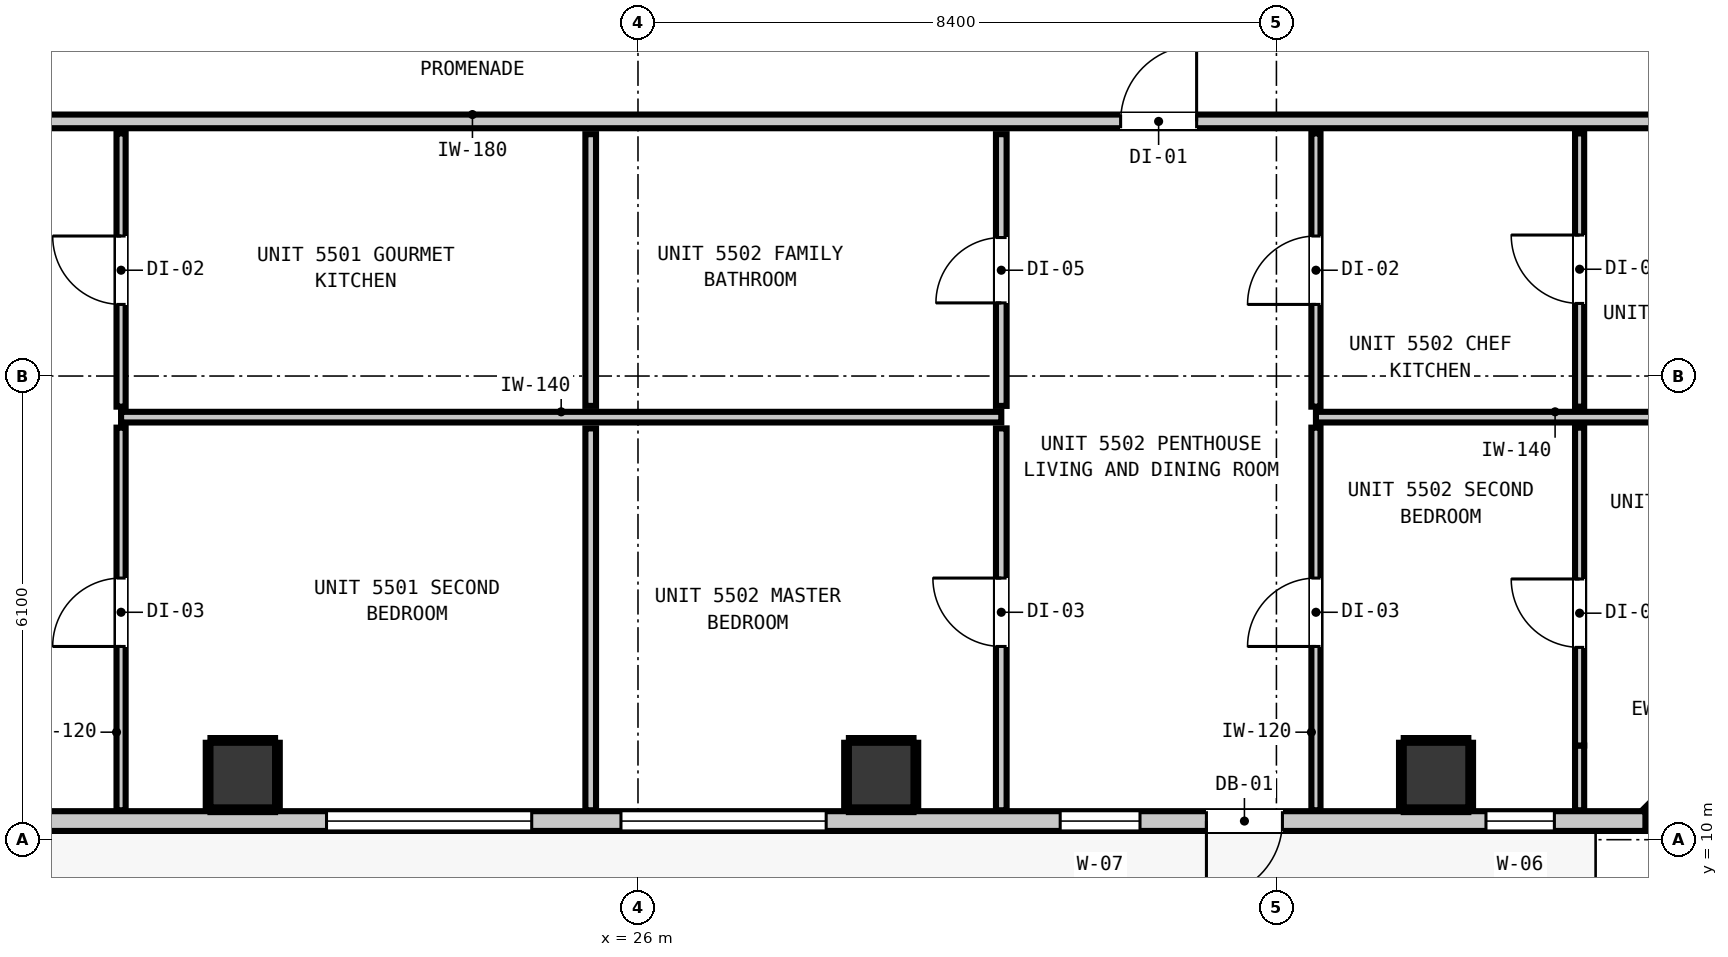
"""IFC4 building model, lengths in metres.
Left out: names, types, materials, properties, quantities, classifications, styles, units other than length and angle.
Written with IfcOpenShell. Run it as: python <this file> out.ifc"""

import sys

from ifc_helpers import new_model, si_unit, direction, frame, frame_2d, origin, origin_2d, place, context, subcontext, project, spatial, rectangle, extrude, element, fill, save


model = new_model("IFC4")
c1 = context("Model", 3, precision=1e-05, world=origin(), true_north=direction((0.0, 1.0)))
c2 = subcontext(c1, "Body", "Model", "MODEL_VIEW")
j1 = project(units=[si_unit("LENGTHUNIT", "METRE"), si_unit("PLANEANGLEUNIT", "RADIAN")], contexts=[c1])
p1 = place(None, origin())
s1 = spatial("IfcSite", under=j1, at=p1, CompositionType="ELEMENT")
p2 = place(p1, origin())
s2 = spatial("IfcBuilding", under=s1, at=p2, CompositionType="ELEMENT")
p3 = place(p2, frame((0.0, 0.0, 190.16)))
s3 = spatial("IfcBuildingStorey", under=s2, at=p3, CompositionType="ELEMENT", Elevation=190.16)
for number, where, z_axis, x_axis in (
    (1, (20.8, 10.85, -0.2), (0.0, 0.0, 1.0), (1.0, 0.0, 0.0)),
    (2, (29.2, 10.85, -0.2), (0.0, 0.0, 1.0), (1.0, 0.0, 0.0)),
    (3, (36.5, 10.85, -0.2), (0.0, 0.0, 1.0), (1.0, 0.0, 0.0)),
):
    element("IfcColumn", number, at=place(p3, frame(where, z_axis=z_axis, x_axis=x_axis)), inside=s3, PredefinedType="COLUMN", context=c2, shape_type="SweptSolid", body=[
        extrude(rectangle(XDim=0.85, YDim=0.85, at=origin_2d()), origin(), (0.0, 0.0, 1.0), 3.52),
    ])
p4 = place(p3, frame((41.355, 12.345, 0.0), z_axis=(0.0, 0.0, 1.0), x_axis=(-0.707147883682, -0.707065676302, 0.0)))
e4 = element("IfcWall", 4, at=p4, inside=s3, PredefinedType="STANDARD", context=c2, shape_type="SweptSolid", body=[
    extrude(rectangle(XDim=2.97, YDim=0.26, at=frame_2d((1.485, 0.0))), origin(), (0.0, 0.0, 1.0), 3.1),
])
p5 = place(p3, frame((39.255, 10.245, 0.0), z_axis=(0.0, 0.0, 1.0), x_axis=(-1.0, 0.0, 0.0)))
e5 = element("IfcWall", 5, at=p5, inside=s3, PredefinedType="STANDARD", context=c2, shape_type="SweptSolid", body=[
    extrude(rectangle(XDim=32.71, YDim=0.26, at=frame_2d((16.355, 0.0))), origin(), (0.0, 0.0, 1.0), 3.1),
])
p6 = place(p5, frame((4.776, 0.0, 0.0)))
e6 = element("IfcOpeningElement", 6, at=p6, cuts=e5, PredefinedType="OPENING", context=c2, shape_type="SweptSolid", body=[
    extrude(rectangle(XDim=1.0, YDim=2.15, at=frame_2d((0.5, 1.075))), frame((0.0, 0.14, 0.0), z_axis=(0.0, -1.0, 0.0), x_axis=(1.0, 0.0, 0.0)), (0.0, 0.0, 1.0), 0.28),
])
p7 = place(p5, frame((21.443, 0.0, 0.85)))
e7 = element("IfcOpeningElement", 7, at=p7, cuts=e5, PredefinedType="OPENING", context=c2, shape_type="SweptSolid", body=[
    extrude(rectangle(XDim=2.7, YDim=2.0, at=frame_2d((1.35, 1.0))), frame((0.0, 0.14, 0.0), z_axis=(0.0, -1.0, 0.0), x_axis=(1.0, 0.0, 0.0)), (0.0, 0.0, 1.0), 0.28),
])
p8 = place(p5, frame((29.443, 0.0, 0.85)))
e8 = element("IfcOpeningElement", 8, at=p8, cuts=e5, PredefinedType="OPENING", context=c2, shape_type="SweptSolid", body=[
    extrude(rectangle(XDim=2.7, YDim=2.0, at=frame_2d((1.35, 1.0))), frame((0.0, 0.14, 0.0), z_axis=(0.0, -1.0, 0.0), x_axis=(1.0, 0.0, 0.0)), (0.0, 0.0, 1.0), 0.28),
])
p9 = place(p5, frame((14.653, 0.0, 0.85)))
e9 = element("IfcOpeningElement", 9, at=p9, cuts=e5, PredefinedType="OPENING", context=c2, shape_type="SweptSolid", body=[
    extrude(rectangle(XDim=2.7, YDim=2.0, at=frame_2d((1.35, 1.0))), frame((0.0, 0.14, 0.0), z_axis=(0.0, -1.0, 0.0), x_axis=(1.0, 0.0, 0.0)), (0.0, 0.0, 1.0), 0.28),
])
p10 = place(p5, frame((6.65, 0.0, 0.85)))
e10 = element("IfcOpeningElement", 10, at=p10, cuts=e5, PredefinedType="OPENING", context=c2, shape_type="SweptSolid", body=[
    extrude(rectangle(XDim=1.05, YDim=1.65, at=frame_2d((0.525, 0.825))), frame((0.0, 0.14, 0.0), z_axis=(0.0, -1.0, 0.0), x_axis=(1.0, 0.0, 0.0)), (0.0, 0.0, 1.0), 0.28),
])
p11 = place(p5, frame((10.779, 0.0, 0.85)))
e11 = element("IfcOpeningElement", 11, at=p11, cuts=e5, PredefinedType="OPENING", context=c2, shape_type="SweptSolid", body=[
    extrude(rectangle(XDim=2.7, YDim=2.0, at=frame_2d((1.35, 1.0))), frame((0.0, 0.14, 0.0), z_axis=(0.0, -1.0, 0.0), x_axis=(1.0, 0.0, 0.0)), (0.0, 0.0, 1.0), 0.28),
])
p12 = place(p5, frame((1.198, 0.0, 0.85)))
e12 = element("IfcOpeningElement", 12, at=p12, cuts=e5, PredefinedType="OPENING", context=c2, shape_type="SweptSolid", body=[
    extrude(rectangle(XDim=0.9, YDim=1.5, at=frame_2d((0.45, 0.75))), frame((0.0, 0.14, 0.0), z_axis=(0.0, -1.0, 0.0), x_axis=(1.0, 0.0, 0.0)), (0.0, 0.0, 1.0), 0.28),
])
p13 = place(p3, frame((4.587, 19.45, 0.0), z_axis=(0.0, 0.0, 1.0), x_axis=(1.0, 0.0, 0.0)))
e13 = element("IfcWall", 13, at=p13, inside=s3, PredefinedType="PARTITIONING", context=c2, shape_type="SweptSolid", body=[
    extrude(rectangle(XDim=36.626, YDim=0.18, at=frame_2d((18.313, 0.0))), origin(), (0.0, 0.0, 1.0), 3.1),
])
p14 = place(p13, frame((9.707, 0.0, 0.0)))
e14 = element("IfcOpeningElement", 14, at=p14, cuts=e13, PredefinedType="OPENING", context=c2, shape_type="SweptSolid", body=[
    extrude(rectangle(XDim=1.0, YDim=2.15, at=frame_2d((0.5, 1.075))), frame((0.0, 0.1, 0.0), z_axis=(0.0, -1.0, 0.0), x_axis=(1.0, 0.0, 0.0)), (0.0, 0.0, 1.0), 0.2),
])
p15 = place(p13, frame((27.763, 0.0, 0.0)))
e15 = element("IfcOpeningElement", 15, at=p15, cuts=e13, PredefinedType="OPENING", context=c2, shape_type="SweptSolid", body=[
    extrude(rectangle(XDim=1.0, YDim=2.15, at=frame_2d((0.5, 1.075))), frame((0.0, 0.1, 0.0), z_axis=(0.0, -1.0, 0.0), x_axis=(1.0, 0.0, 0.0)), (0.0, 0.0, 1.0), 0.2),
])
p16 = place(p3, frame((19.199, 15.559, 0.0), z_axis=(0.0, 0.0, 1.0), x_axis=(1.0, 0.0, 0.0)))
e16 = element("IfcWall", 16, at=p16, inside=s3, PredefinedType="PARTITIONING", context=c2, shape_type="SweptSolid", body=[
    extrude(rectangle(XDim=11.581, YDim=0.14, at=frame_2d((5.791, 0.0))), origin(), (0.0, 0.0, 1.0), 3.1),
])
p17 = place(p3, frame((34.92, 15.559, 0.0), z_axis=(0.0, 0.0, 1.0), x_axis=(1.0, 0.0, 0.0)))
e17 = element("IfcWall", 17, at=p17, inside=s3, PredefinedType="PARTITIONING", context=c2, shape_type="SweptSolid", body=[
    extrude(rectangle(XDim=6.293, YDim=0.14, at=frame_2d((3.146, 0.0))), origin(), (0.0, 0.0, 1.0), 3.1),
])
p18 = place(p3, frame((25.378, 10.387, 0.0), z_axis=(0.0, 0.0, 1.0), x_axis=(0.0, 1.0, 0.0)))
e18 = element("IfcWall", 18, at=p18, inside=s3, PredefinedType="PARTITIONING", context=c2, shape_type="SweptSolid", body=[
    extrude(rectangle(XDim=5.024, YDim=0.14, at=frame_2d((2.512, 0.0))), origin(), (0.0, 0.0, 1.0), 3.1),
])
p19 = place(p3, frame((25.378, 15.707, 0.0), z_axis=(0.0, 0.0, 1.0), x_axis=(0.0, 1.0, 0.0)))
e19 = element("IfcWall", 19, at=p19, inside=s3, PredefinedType="PARTITIONING", context=c2, shape_type="SweptSolid", body=[
    extrude(rectangle(XDim=3.575, YDim=0.14, at=frame_2d((1.788, 0.0))), origin(), (0.0, 0.0, 1.0), 3.1),
])
p20 = place(p3, frame((30.78, 10.387, 0.0), z_axis=(0.0, 0.0, 1.0), x_axis=(0.0, 1.0, 0.0)))
e20 = element("IfcWall", 20, at=p20, inside=s3, PredefinedType="PARTITIONING", context=c2, shape_type="SweptSolid", body=[
    extrude(rectangle(XDim=5.024, YDim=0.14, at=frame_2d((2.512, 0.0))), origin(), (0.0, 0.0, 1.0), 3.1),
])
p21 = place(p20, frame((2.155, 0.0, 0.0)))
e21 = element("IfcOpeningElement", 21, at=p21, cuts=e20, PredefinedType="OPENING", context=c2, shape_type="SweptSolid", body=[
    extrude(rectangle(XDim=0.9, YDim=2.1, at=frame_2d((0.45, 1.05))), frame((0.0, 0.08, 0.0), z_axis=(0.0, -1.0, 0.0), x_axis=(1.0, 0.0, 0.0)), (0.0, 0.0, 1.0), 0.16),
])
p22 = place(p3, frame((30.78, 15.707, 0.0), z_axis=(0.0, 0.0, 1.0), x_axis=(0.0, 1.0, 0.0)))
e22 = element("IfcWall", 22, at=p22, inside=s3, PredefinedType="PARTITIONING", context=c2, shape_type="SweptSolid", body=[
    extrude(rectangle(XDim=3.575, YDim=0.14, at=frame_2d((1.788, 0.0))), origin(), (0.0, 0.0, 1.0), 3.1),
])
p23 = place(p22, frame((1.355, 0.0, 0.0)))
e23 = element("IfcOpeningElement", 23, at=p23, cuts=e22, PredefinedType="OPENING", context=c2, shape_type="SweptSolid", body=[
    extrude(rectangle(XDim=0.86, YDim=2.02, at=frame_2d((0.43, 1.01))), frame((0.0, 0.08, 0.0), z_axis=(0.0, -1.0, 0.0), x_axis=(1.0, 0.0, 0.0)), (0.0, 0.0, 1.0), 0.16),
])
p24 = place(p3, frame((19.199, 10.387, 0.0), z_axis=(0.0, 0.0, 1.0), x_axis=(0.0, 1.0, 0.0)))
e24 = element("IfcWall", 24, at=p24, inside=s3, PredefinedType="PARTITIONING", context=c2, shape_type="SweptSolid", body=[
    extrude(rectangle(XDim=5.034, YDim=0.12, at=frame_2d((2.517, 0.0))), origin(), (0.0, 0.0, 1.0), 3.1),
])
p25 = place(p24, frame((2.155, 0.0, 0.0)))
e25 = element("IfcOpeningElement", 25, at=p25, cuts=e24, PredefinedType="OPENING", context=c2, shape_type="SweptSolid", body=[
    extrude(rectangle(XDim=0.9, YDim=2.1, at=frame_2d((0.45, 1.05))), frame((0.0, 0.07, 0.0), z_axis=(0.0, -1.0, 0.0), x_axis=(1.0, 0.0, 0.0)), (0.0, 0.0, 1.0), 0.14),
])
p26 = place(p3, frame((19.199, 15.697, 0.0), z_axis=(0.0, 0.0, 1.0), x_axis=(0.0, 1.0, 0.0)))
e26 = element("IfcWall", 26, at=p26, inside=s3, PredefinedType="PARTITIONING", context=c2, shape_type="SweptSolid", body=[
    extrude(rectangle(XDim=3.595, YDim=0.12, at=frame_2d((1.797, 0.0))), origin(), (0.0, 0.0, 1.0), 3.1),
])
p27 = place(p26, frame((1.345, 0.0, 0.0)))
e27 = element("IfcOpeningElement", 27, at=p27, cuts=e26, PredefinedType="OPENING", context=c2, shape_type="SweptSolid", body=[
    extrude(rectangle(XDim=0.9, YDim=2.1, at=frame_2d((0.45, 1.05))), frame((0.0, 0.07, 0.0), z_axis=(0.0, -1.0, 0.0), x_axis=(1.0, 0.0, 0.0)), (0.0, 0.0, 1.0), 0.14),
])
p28 = place(p3, frame((34.92, 10.387, 0.0), z_axis=(0.0, 0.0, 1.0), x_axis=(0.0, 1.0, 0.0)))
e28 = element("IfcWall", 28, at=p28, inside=s3, PredefinedType="PARTITIONING", context=c2, shape_type="SweptSolid", body=[
    extrude(rectangle(XDim=5.034, YDim=0.12, at=frame_2d((2.517, 0.0))), origin(), (0.0, 0.0, 1.0), 3.1),
])
p29 = place(p28, frame((2.155, 0.0, 0.0)))
e29 = element("IfcOpeningElement", 29, at=p29, cuts=e28, PredefinedType="OPENING", context=c2, shape_type="SweptSolid", body=[
    extrude(rectangle(XDim=0.9, YDim=2.1, at=frame_2d((0.45, 1.05))), frame((0.0, 0.07, 0.0), z_axis=(0.0, -1.0, 0.0), x_axis=(1.0, 0.0, 0.0)), (0.0, 0.0, 1.0), 0.14),
])
p30 = place(p3, frame((34.92, 15.697, 0.0), z_axis=(0.0, 0.0, 1.0), x_axis=(0.0, 1.0, 0.0)))
e30 = element("IfcWall", 30, at=p30, inside=s3, PredefinedType="PARTITIONING", context=c2, shape_type="SweptSolid", body=[
    extrude(rectangle(XDim=3.595, YDim=0.12, at=frame_2d((1.797, 0.0))), origin(), (0.0, 0.0, 1.0), 3.1),
])
p31 = place(p30, frame((1.345, 0.0, 0.0)))
e31 = element("IfcOpeningElement", 31, at=p31, cuts=e30, PredefinedType="OPENING", context=c2, shape_type="SweptSolid", body=[
    extrude(rectangle(XDim=0.9, YDim=2.1, at=frame_2d((0.45, 1.05))), frame((0.0, 0.07, 0.0), z_axis=(0.0, -1.0, 0.0), x_axis=(1.0, 0.0, 0.0)), (0.0, 0.0, 1.0), 0.14),
])
p32 = place(p3, frame((38.389, 10.387, 0.0), z_axis=(0.0, 0.0, 1.0), x_axis=(0.0, 1.0, 0.0)))
e32 = element("IfcWall", 32, at=p32, inside=s3, PredefinedType="PARTITIONING", context=c2, shape_type="SweptSolid", body=[
    extrude(rectangle(XDim=0.852, YDim=0.12, at=frame_2d((0.426, 0.0))), origin(), (0.0, 0.0, 1.0), 3.1),
])
p33 = place(p3, frame((38.389, 11.239, 0.0), z_axis=(0.0, 0.0, 1.0), x_axis=(0.0, 1.0, 0.0)))
e33 = element("IfcWall", 33, at=p33, inside=s3, PredefinedType="PARTITIONING", context=c2, shape_type="SweptSolid", body=[
    extrude(rectangle(XDim=4.182, YDim=0.12, at=frame_2d((2.091, 0.0))), origin(), (0.0, 0.0, 1.0), 2.477),
])
p34 = place(p33, frame((1.291, 0.0, 0.0)))
e34 = element("IfcOpeningElement", 34, at=p34, cuts=e33, PredefinedType="OPENING", context=c2, shape_type="SweptSolid", body=[
    extrude(rectangle(XDim=0.9, YDim=2.1, at=frame_2d((0.45, 1.05))), frame((0.0, 0.07, 0.0), z_axis=(0.0, -1.0, 0.0), x_axis=(1.0, 0.0, 0.0)), (0.0, 0.0, 1.0), 0.14),
])
p35 = place(p3, frame((38.389, 15.697, 0.0), z_axis=(0.0, 0.0, 1.0), x_axis=(0.0, 1.0, 0.0)))
e35 = element("IfcWall", 35, at=p35, inside=s3, PredefinedType="PARTITIONING", context=c2, shape_type="SweptSolid", body=[
    extrude(rectangle(XDim=3.595, YDim=0.12, at=frame_2d((1.797, 0.0))), origin(), (0.0, 0.0, 1.0), 2.477),
])
p36 = place(p35, frame((1.358, 0.0, 0.0)))
e36 = element("IfcOpeningElement", 36, at=p36, cuts=e35, PredefinedType="OPENING", context=c2, shape_type="SweptSolid", body=[
    extrude(rectangle(XDim=0.9, YDim=2.1, at=frame_2d((0.45, 1.05))), frame((0.0, 0.07, 0.0), z_axis=(0.0, -1.0, 0.0), x_axis=(1.0, 0.0, 0.0)), (0.0, 0.0, 1.0), 0.14),
])
for number, where, z_axis, x_axis in (
    (37, (20.375, 10.393, 0.0), (0.0, 0.0, 1.0), (1.0, 0.0, 0.0)),
    (38, (20.375, 11.307, 0.0), (0.0, 0.0, 1.0), (1.0, 0.0, 0.0)),
):
    element("IfcWall", number, at=place(p3, frame(where, z_axis=z_axis, x_axis=x_axis)), inside=s3, PredefinedType="PARTITIONING", context=c2, shape_type="SweptSolid", body=[
        extrude(rectangle(XDim=0.85, YDim=0.06, at=frame_2d((0.425, 0.0))), origin(), (0.0, 0.0, 1.0), 1.45),
    ])
for number, where, z_axis, x_axis in (
    (39, (20.343, 10.425, 0.0), (0.0, 0.0, 1.0), (0.0, 1.0, 0.0)),
    (40, (21.257, 10.425, 0.0), (0.0, 0.0, 1.0), (0.0, 1.0, 0.0)),
):
    element("IfcWall", number, at=place(p3, frame(where, z_axis=z_axis, x_axis=x_axis)), inside=s3, PredefinedType="PARTITIONING", context=c2, shape_type="SweptSolid", body=[
        extrude(rectangle(XDim=0.85, YDim=0.06, at=frame_2d((0.425, 0.0))), origin(), (0.0, 0.0, 1.0), 1.45),
    ])
for number, where, z_axis, x_axis in (
    (41, (28.775, 10.393, 0.0), (0.0, 0.0, 1.0), (1.0, 0.0, 0.0)),
    (42, (28.775, 11.307, 0.0), (0.0, 0.0, 1.0), (1.0, 0.0, 0.0)),
):
    element("IfcWall", number, at=place(p3, frame(where, z_axis=z_axis, x_axis=x_axis)), inside=s3, PredefinedType="PARTITIONING", context=c2, shape_type="SweptSolid", body=[
        extrude(rectangle(XDim=0.85, YDim=0.06, at=frame_2d((0.425, 0.0))), origin(), (0.0, 0.0, 1.0), 1.45),
    ])
for number, where, z_axis, x_axis in (
    (43, (28.743, 10.425, 0.0), (0.0, 0.0, 1.0), (0.0, 1.0, 0.0)),
    (44, (29.657, 10.425, 0.0), (0.0, 0.0, 1.0), (0.0, 1.0, 0.0)),
):
    element("IfcWall", number, at=place(p3, frame(where, z_axis=z_axis, x_axis=x_axis)), inside=s3, PredefinedType="PARTITIONING", context=c2, shape_type="SweptSolid", body=[
        extrude(rectangle(XDim=0.85, YDim=0.06, at=frame_2d((0.425, 0.0))), origin(), (0.0, 0.0, 1.0), 1.45),
    ])
for number, where, z_axis, x_axis in (
    (45, (36.075, 10.393, 0.0), (0.0, 0.0, 1.0), (1.0, 0.0, 0.0)),
    (46, (36.075, 11.307, 0.0), (0.0, 0.0, 1.0), (1.0, 0.0, 0.0)),
):
    element("IfcWall", number, at=place(p3, frame(where, z_axis=z_axis, x_axis=x_axis)), inside=s3, PredefinedType="PARTITIONING", context=c2, shape_type="SweptSolid", body=[
        extrude(rectangle(XDim=0.85, YDim=0.06, at=frame_2d((0.425, 0.0))), origin(), (0.0, 0.0, 1.0), 1.45),
    ])
for number, where, z_axis, x_axis in (
    (47, (36.043, 10.425, 0.0), (0.0, 0.0, 1.0), (0.0, 1.0, 0.0)),
    (48, (36.957, 10.425, 0.0), (0.0, 0.0, 1.0), (0.0, 1.0, 0.0)),
):
    element("IfcWall", number, at=place(p3, frame(where, z_axis=z_axis, x_axis=x_axis)), inside=s3, PredefinedType="PARTITIONING", context=c2, shape_type="SweptSolid", body=[
        extrude(rectangle(XDim=0.85, YDim=0.06, at=frame_2d((0.425, 0.0))), origin(), (0.0, 0.0, 1.0), 1.45),
    ])
p37 = place(p6, origin())
e49 = element("IfcDoor", 49, at=p37, inside=s3, OperationType="SINGLE_SWING_RIGHT", PredefinedType="DOOR", context=c2, shape_type="SweptSolid", body=[
    extrude(rectangle(XDim=1.0, YDim=2.15, at=frame_2d((0.5, 1.075))), frame((0.0, 0.025, 0.0), z_axis=(0.0, -1.0, 0.0), x_axis=(1.0, 0.0, 0.0)), (0.0, 0.0, 1.0), 0.05),
])
fill(e6, e49)
p38 = place(p9, origin())
e50 = element("IfcWindow", 50, at=p38, inside=s3, PartitioningType="SINGLE_PANEL", PredefinedType="WINDOW", context=c2, shape_type="SweptSolid", body=[
    extrude(rectangle(XDim=2.7, YDim=2.0, at=frame_2d((1.35, 1.0))), frame((0.0, 0.03, 0.0), z_axis=(0.0, -1.0, 0.0), x_axis=(1.0, 0.0, 0.0)), (0.0, 0.0, 1.0), 0.06),
])
fill(e9, e50)
p39 = place(p10, origin())
e51 = element("IfcWindow", 51, at=p39, inside=s3, PartitioningType="SINGLE_PANEL", PredefinedType="WINDOW", context=c2, shape_type="SweptSolid", body=[
    extrude(rectangle(XDim=1.05, YDim=1.65, at=frame_2d((0.525, 0.825))), frame((0.0, 0.03, 0.0), z_axis=(0.0, -1.0, 0.0), x_axis=(1.0, 0.0, 0.0)), (0.0, 0.0, 1.0), 0.06),
])
fill(e10, e51)
p40 = place(p11, origin())
e52 = element("IfcWindow", 52, at=p40, inside=s3, PartitioningType="SINGLE_PANEL", PredefinedType="WINDOW", context=c2, shape_type="SweptSolid", body=[
    extrude(rectangle(XDim=2.7, YDim=2.0, at=frame_2d((1.35, 1.0))), frame((0.0, 0.03, 0.0), z_axis=(0.0, -1.0, 0.0), x_axis=(1.0, 0.0, 0.0)), (0.0, 0.0, 1.0), 0.06),
])
fill(e11, e52)
p41 = place(p12, origin())
e53 = element("IfcWindow", 53, at=p41, inside=s3, PartitioningType="SINGLE_PANEL", PredefinedType="WINDOW", context=c2, shape_type="SweptSolid", body=[
    extrude(rectangle(XDim=0.9, YDim=1.5, at=frame_2d((0.45, 0.75))), frame((0.0, 0.03, 0.0), z_axis=(0.0, -1.0, 0.0), x_axis=(1.0, 0.0, 0.0)), (0.0, 0.0, 1.0), 0.06),
])
fill(e12, e53)
p42 = place(p27, origin())
e54 = element("IfcDoor", 54, at=p42, inside=s3, OperationType="SINGLE_SWING_RIGHT", PredefinedType="DOOR", context=c2, shape_type="SweptSolid", body=[
    extrude(rectangle(XDim=0.9, YDim=2.1, at=frame_2d((0.45, 1.05))), frame((0.0, 0.025, 0.0), z_axis=(0.0, -1.0, 0.0), x_axis=(1.0, 0.0, 0.0)), (0.0, 0.0, 1.0), 0.05),
])
fill(e27, e54)
p43 = place(p25, origin())
e55 = element("IfcDoor", 55, at=p43, inside=s3, OperationType="SINGLE_SWING_LEFT", PredefinedType="DOOR", context=c2, shape_type="SweptSolid", body=[
    extrude(rectangle(XDim=0.9, YDim=2.1, at=frame_2d((0.45, 1.05))), frame((0.0, 0.025, 0.0), z_axis=(0.0, -1.0, 0.0), x_axis=(1.0, 0.0, 0.0)), (0.0, 0.0, 1.0), 0.05),
])
fill(e25, e55)
p44 = place(p15, origin())
e56 = element("IfcDoor", 56, at=p44, inside=s3, OperationType="SINGLE_SWING_RIGHT", PredefinedType="DOOR", context=c2, shape_type="SweptSolid", body=[
    extrude(rectangle(XDim=1.0, YDim=2.15, at=frame_2d((0.5, 1.075))), frame((0.0, 0.025, 0.0), z_axis=(0.0, -1.0, 0.0), x_axis=(1.0, 0.0, 0.0)), (0.0, 0.0, 1.0), 0.05),
])
fill(e15, e56)
p45 = place(p23, origin())
e57 = element("IfcDoor", 57, at=p45, inside=s3, OperationType="SINGLE_SWING_LEFT", PredefinedType="DOOR", context=c2, shape_type="SweptSolid", body=[
    extrude(rectangle(XDim=0.86, YDim=2.02, at=frame_2d((0.43, 1.01))), frame((0.0, 0.025, 0.0), z_axis=(0.0, -1.0, 0.0), x_axis=(1.0, 0.0, 0.0)), (0.0, 0.0, 1.0), 0.05),
])
fill(e23, e57)
p46 = place(p21, origin())
e58 = element("IfcDoor", 58, at=p46, inside=s3, OperationType="SINGLE_SWING_RIGHT", PredefinedType="DOOR", context=c2, shape_type="SweptSolid", body=[
    extrude(rectangle(XDim=0.9, YDim=2.1, at=frame_2d((0.45, 1.05))), frame((0.0, 0.025, 0.0), z_axis=(0.0, -1.0, 0.0), x_axis=(1.0, 0.0, 0.0)), (0.0, 0.0, 1.0), 0.05),
])
fill(e21, e58)
p47 = place(p31, origin())
e59 = element("IfcDoor", 59, at=p47, inside=s3, OperationType="SINGLE_SWING_LEFT", PredefinedType="DOOR", context=c2, shape_type="SweptSolid", body=[
    extrude(rectangle(XDim=0.9, YDim=2.1, at=frame_2d((0.45, 1.05))), frame((0.0, 0.025, 0.0), z_axis=(0.0, -1.0, 0.0), x_axis=(1.0, 0.0, 0.0)), (0.0, 0.0, 1.0), 0.05),
])
fill(e31, e59)
p48 = place(p36, origin())
e60 = element("IfcDoor", 60, at=p48, inside=s3, OperationType="SINGLE_SWING_RIGHT", PredefinedType="DOOR", context=c2, shape_type="SweptSolid", body=[
    extrude(rectangle(XDim=0.9, YDim=2.1, at=frame_2d((0.45, 1.05))), frame((0.0, 0.025, 0.0), z_axis=(0.0, -1.0, 0.0), x_axis=(1.0, 0.0, 0.0)), (0.0, 0.0, 1.0), 0.05),
])
fill(e36, e60)
p49 = place(p29, origin())
e61 = element("IfcDoor", 61, at=p49, inside=s3, OperationType="SINGLE_SWING_LEFT", PredefinedType="DOOR", context=c2, shape_type="SweptSolid", body=[
    extrude(rectangle(XDim=0.9, YDim=2.1, at=frame_2d((0.45, 1.05))), frame((0.0, 0.025, 0.0), z_axis=(0.0, -1.0, 0.0), x_axis=(1.0, 0.0, 0.0)), (0.0, 0.0, 1.0), 0.05),
])
fill(e29, e61)
p50 = place(p34, origin())
e62 = element("IfcDoor", 62, at=p50, inside=s3, OperationType="SINGLE_SWING_RIGHT", PredefinedType="DOOR", context=c2, shape_type="SweptSolid", body=[
    extrude(rectangle(XDim=0.9, YDim=2.1, at=frame_2d((0.45, 1.05))), frame((0.0, 0.025, 0.0), z_axis=(0.0, -1.0, 0.0), x_axis=(1.0, 0.0, 0.0)), (0.0, 0.0, 1.0), 0.05),
])
fill(e34, e62)
save(model, sys.argv[1])
